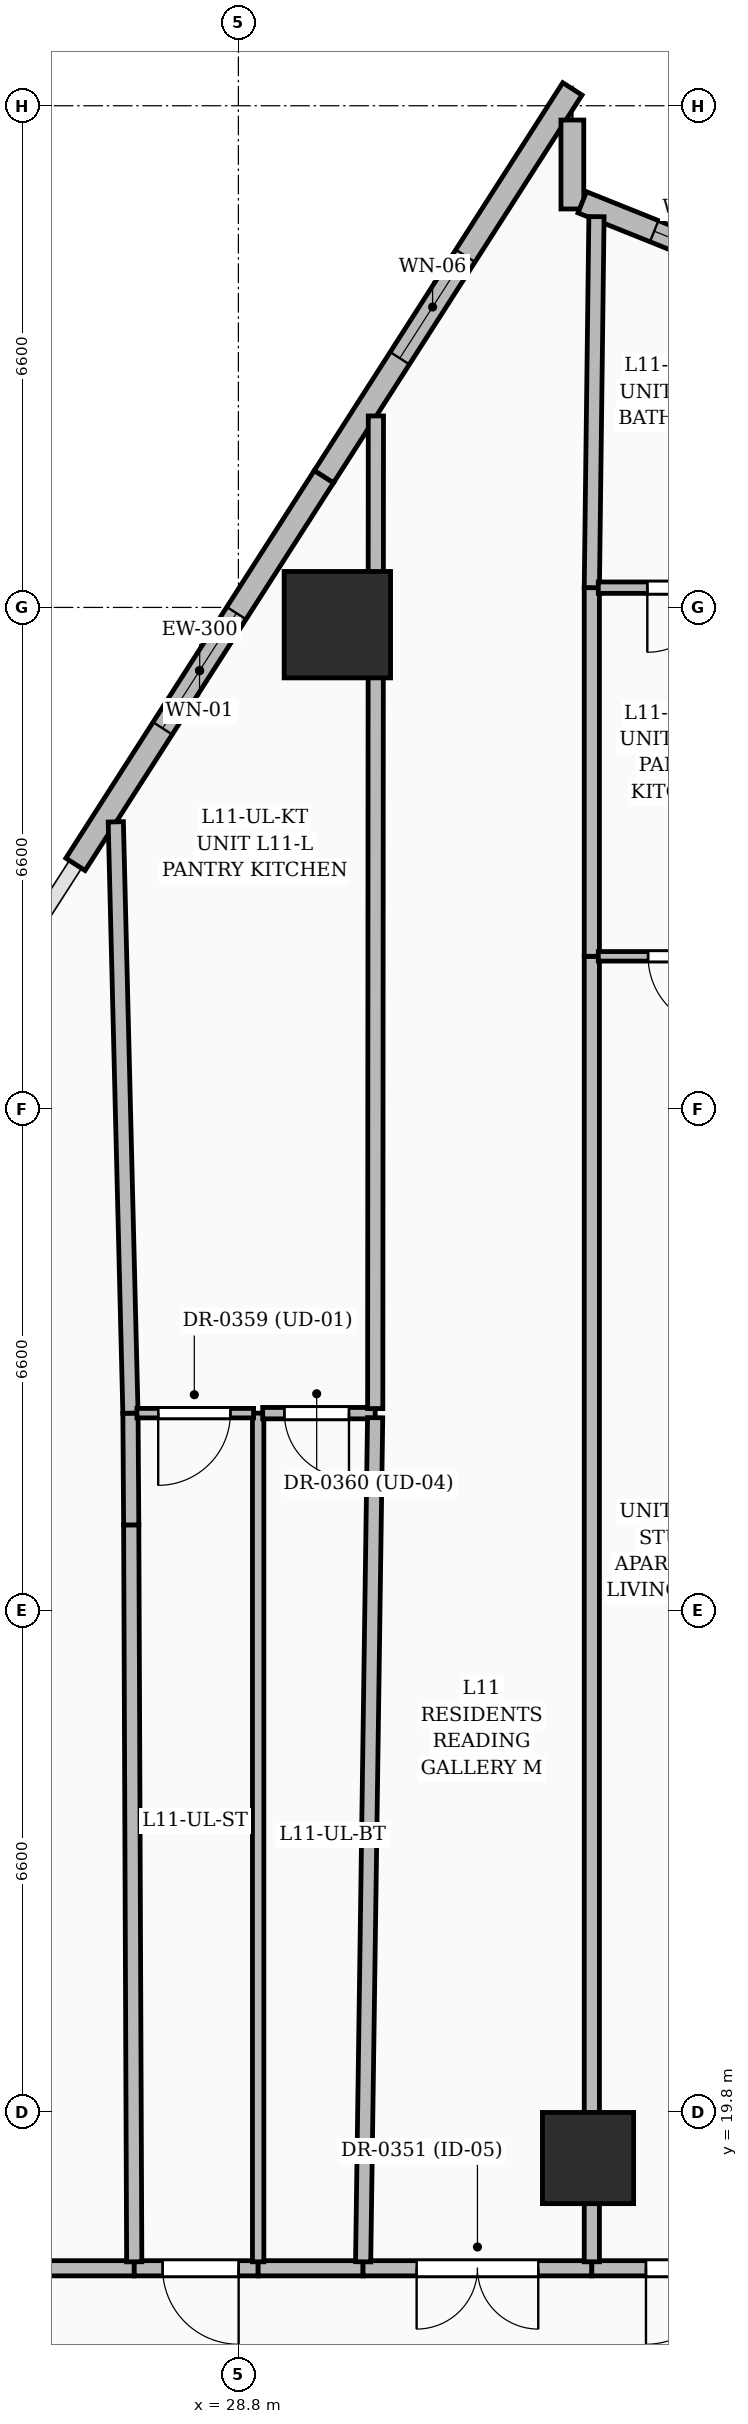
"""IFC4 building model, lengths in metres.
Left out: names, types, materials, properties, quantities, classifications, styles, units other than length and angle.
Written with IfcOpenShell. Run it as: python <this file> out.ifc"""

import sys

from ifc_helpers import new_model, si_unit, direction, frame, frame_2d, origin, origin_2d, place, context, subcontext, project, spatial, rectangle, extrude, element, fill, save


model = new_model("IFC4")
c1 = context("Model", 3, precision=1e-05, world=origin(), true_north=direction((0.0, 1.0)))
c2 = subcontext(c1, "Body", "Model", "MODEL_VIEW")
j1 = project(units=[si_unit("LENGTHUNIT", "METRE"), si_unit("PLANEANGLEUNIT", "RADIAN")], contexts=[c1])
p1 = place(None, origin())
s1 = spatial("IfcSite", under=j1, at=p1, CompositionType="ELEMENT")
p2 = place(p1, origin())
s2 = spatial("IfcBuilding", under=s1, at=p2, CompositionType="ELEMENT")
p3 = place(p2, frame((0.0, 0.0, 49.8)))
s3 = spatial("IfcBuildingStorey", under=s2, at=p3, CompositionType="ELEMENT", Elevation=49.8)
p4 = place(p3, frame((33.4, 19.2, 0.0), z_axis=(0.0, 0.0, 1.0), x_axis=(1.0, 0.0, 0.0)))
e1 = element("IfcColumn", 1, at=p4, inside=s3, PredefinedType="COLUMN", context=c2, shape_type="SweptSolid", body=[
    extrude(rectangle(XDim=1.2, YDim=1.2, at=origin_2d()), origin(), (0.0, 0.0, 1.0), 3.6),
])
p5 = place(p3, frame((30.102, 39.373, 0.0), z_axis=(0.0, 0.0, 1.0), x_axis=(1.0, 0.0, 0.0)))
e2 = element("IfcColumn", 2, at=p5, inside=s3, PredefinedType="COLUMN", context=c2, shape_type="SweptSolid", body=[
    extrude(rectangle(XDim=1.4, YDim=1.4, at=origin_2d()), origin(), (0.0, 0.0, 1.0), 3.6),
])
p6 = place(p3, frame((26.657, 36.22, 0.0), z_axis=(0.0, 0.0, 1.0), x_axis=(0.539506453767, 0.841981464371, 0.0)))
e3 = element("IfcWall", 3, at=p6, inside=s3, PredefinedType="SOLIDWALL", context=c2, shape_type="SweptSolid", body=[
    extrude(rectangle(XDim=6.058, YDim=0.3, at=frame_2d((3.029, 0.0))), origin(), (0.0, 0.0, 1.0), 3.35),
])
p7 = place(p6, frame((2.125, 0.0, 0.6)))
e4 = element("IfcOpeningElement", 4, at=p7, cuts=e3, PredefinedType="OPENING", context=c2, shape_type="SweptSolid", body=[
    extrude(rectangle(XDim=1.8, YDim=2.1, at=frame_2d((0.9, 1.05))), frame((0.0, 0.16, 0.0), z_axis=(0.0, -1.0, 0.0), x_axis=(1.0, 0.0, 0.0)), (0.0, 0.0, 1.0), 0.32),
])
p8 = place(p3, frame((29.925, 41.321, 0.0), z_axis=(0.0, 0.0, 1.0), x_axis=(0.53953502124, 0.841963158847, 0.0)))
e5 = element("IfcWall", 5, at=p8, inside=s3, PredefinedType="SOLIDWALL", context=c2, shape_type="SweptSolid", body=[
    extrude(rectangle(XDim=6.059, YDim=0.3, at=frame_2d((3.029, 0.0))), origin(), (0.0, 0.0, 1.0), 3.35),
])
p9 = place(p8, frame((1.85, 0.0, 0.55)))
e6 = element("IfcOpeningElement", 6, at=p9, cuts=e5, PredefinedType="OPENING", context=c2, shape_type="SweptSolid", body=[
    extrude(rectangle(XDim=1.6, YDim=2.2, at=frame_2d((0.8, 1.1))), frame((0.0, 0.16, 0.0), z_axis=(0.0, -1.0, 0.0), x_axis=(1.0, 0.0, 0.0)), (0.0, 0.0, 1.0), 0.32),
])
p10 = place(p3, frame((33.194, 46.012, 0.0), z_axis=(0.0, 0.0, 1.0), x_axis=(0.0, -1.0, 0.0)))
e7 = element("IfcWall", 7, at=p10, inside=s3, PredefinedType="SOLIDWALL", context=c2, shape_type="SweptSolid", body=[
    extrude(rectangle(XDim=1.17, YDim=0.3, at=frame_2d((0.585, 0.0))), origin(), (0.0, 0.0, 1.0), 3.35),
])
p11 = place(p3, frame((33.324, 44.93, 0.0), z_axis=(0.0, 0.0, 1.0), x_axis=(0.928091921944, -0.372351157407, 0.0)))
e8 = element("IfcWall", 8, at=p11, inside=s3, PredefinedType="SOLIDWALL", context=c2, shape_type="SweptSolid", body=[
    extrude(rectangle(XDim=3.023, YDim=0.3, at=frame_2d((1.512, 0.0))), origin(), (0.0, 0.0, 1.0), 3.35),
])
p12 = place(p11, frame((1.02, 0.0, 0.8)))
e9 = element("IfcOpeningElement", 9, at=p12, cuts=e8, PredefinedType="OPENING", context=c2, shape_type="SweptSolid", body=[
    extrude(rectangle(XDim=1.2, YDim=1.8, at=frame_2d((0.6, 0.9))), frame((0.0, 0.16, 0.0), z_axis=(0.0, -1.0, 0.0), x_axis=(1.0, 0.0, 0.0)), (0.0, 0.0, 1.0), 0.32),
])
p13 = place(p3, frame((27.43, 17.75, 0.0), z_axis=(0.0, 0.0, 1.0), x_axis=(-1.0, 0.0, 0.0)))
e10 = element("IfcWall", 10, at=p13, inside=s3, PredefinedType="PARTITIONING", context=c2, shape_type="SweptSolid", body=[
    extrude(rectangle(XDim=5.945, YDim=0.2, at=frame_2d((2.972, 0.0))), origin(), (0.0, 0.0, 1.0), 1.12),
])
p14 = place(p3, frame((29.06, 17.75, 0.0), z_axis=(0.0, 0.0, 1.0), x_axis=(-1.0, 0.0, 0.0)))
e11 = element("IfcWall", 11, at=p14, inside=s3, PredefinedType="PARTITIONING", context=c2, shape_type="SweptSolid", body=[
    extrude(rectangle(XDim=1.63, YDim=0.2, at=frame_2d((0.815, 0.0))), origin(), (0.0, 0.0, 1.0), 3.35),
])
p15 = place(p14, frame((0.257, 0.0, 0.0)))
e12 = element("IfcOpeningElement", 12, at=p15, cuts=e11, PredefinedType="OPENING", context=c2, shape_type="SweptSolid", body=[
    extrude(rectangle(XDim=1.0, YDim=2.2, at=frame_2d((0.5, 1.1))), frame((0.0, 0.11, 0.0), z_axis=(0.0, -1.0, 0.0), x_axis=(1.0, 0.0, 0.0)), (0.0, 0.0, 1.0), 0.22),
])
p16 = place(p3, frame((30.44, 17.75, 0.0), z_axis=(0.0, 0.0, 1.0), x_axis=(-1.0, 0.0, 0.0)))
e13 = element("IfcWall", 13, at=p16, inside=s3, PredefinedType="PARTITIONING", context=c2, shape_type="SweptSolid", body=[
    extrude(rectangle(XDim=1.38, YDim=0.2, at=frame_2d((0.69, 0.0))), origin(), (0.0, 0.0, 1.0), 3.35),
])
p17 = place(p3, frame((33.45, 17.75, 0.0), z_axis=(0.0, 0.0, 1.0), x_axis=(-1.0, 0.0, 0.0)))
e14 = element("IfcWall", 14, at=p17, inside=s3, PredefinedType="PARTITIONING", context=c2, shape_type="SweptSolid", body=[
    extrude(rectangle(XDim=3.01, YDim=0.2, at=frame_2d((1.505, 0.0))), origin(), (0.0, 0.0, 1.0), 3.35),
])
p18 = place(p17, frame((0.705, 0.0, 0.0)))
e15 = element("IfcOpeningElement", 15, at=p18, cuts=e14, PredefinedType="OPENING", context=c2, shape_type="SweptSolid", body=[
    extrude(rectangle(XDim=1.6, YDim=2.3, at=frame_2d((0.8, 1.15))), frame((0.0, 0.11, 0.0), z_axis=(0.0, -1.0, 0.0), x_axis=(1.0, 0.0, 0.0)), (0.0, 0.0, 1.0), 0.22),
])
p19 = place(p3, frame((35.76, 17.75, 0.0), z_axis=(0.0, 0.0, 1.0), x_axis=(-1.0, 0.0, 0.0)))
e16 = element("IfcWall", 16, at=p19, inside=s3, PredefinedType="PARTITIONING", context=c2, shape_type="SweptSolid", body=[
    extrude(rectangle(XDim=2.31, YDim=0.2, at=frame_2d((1.155, 0.0))), origin(), (0.0, 0.0, 1.0), 2.309),
])
p20 = place(p19, frame((0.598, 0.0, 0.0)))
e17 = element("IfcOpeningElement", 17, at=p20, cuts=e16, PredefinedType="OPENING", context=c2, shape_type="SweptSolid", body=[
    extrude(rectangle(XDim=1.0, YDim=2.2, at=frame_2d((0.5, 1.1))), frame((0.0, 0.11, 0.0), z_axis=(0.0, -1.0, 0.0), x_axis=(1.0, 0.0, 0.0)), (0.0, 0.0, 1.0), 0.22),
])
p21 = place(p3, frame((27.43, 17.835, 0.0), z_axis=(0.0, 0.0, 1.0), x_axis=(-0.004104621563, 0.999991576005, 0.0)))
e18 = element("IfcWall", 18, at=p21, inside=s3, PredefinedType="PARTITIONING", context=c2, shape_type="SweptSolid", body=[
    extrude(rectangle(XDim=9.695, YDim=0.2, at=frame_2d((4.848, 0.0))), origin(), (0.0, 0.0, 1.0), 1.12),
])
p22 = place(p3, frame((27.39, 27.53, 0.0), z_axis=(0.0, 0.0, 1.0), x_axis=(-0.006809342213, 0.999976816161, 0.0)))
e19 = element("IfcWall", 19, at=p22, inside=s3, PredefinedType="PARTITIONING", context=c2, shape_type="SweptSolid", body=[
    extrude(rectangle(XDim=1.47, YDim=0.2, at=frame_2d((0.735, 0.0))), origin(), (0.0, 0.0, 1.0), 2.911),
])
p23 = place(p3, frame((27.38, 29.0, 0.0), z_axis=(0.0, 0.0, 1.0), x_axis=(-0.024786030679, 0.999692779149, 0.0)))
e20 = element("IfcWall", 20, at=p23, inside=s3, PredefinedType="PARTITIONING", context=c2, shape_type="SweptSolid", body=[
    extrude(rectangle(XDim=7.781, YDim=0.2, at=frame_2d((3.891, 0.0))), origin(), (0.0, 0.0, 1.0), 2.37),
])
p24 = place(p3, frame((29.06, 17.835, 0.0), z_axis=(0.0, 0.0, 1.0), x_axis=(0.0, 1.0, 0.0)))
e21 = element("IfcWall", 21, at=p24, inside=s3, PredefinedType="PARTITIONING", context=c2, shape_type="SweptSolid", body=[
    extrude(rectangle(XDim=11.165, YDim=0.15, at=frame_2d((5.583, 0.0))), origin(), (0.0, 0.0, 1.0), 1.12),
])
p25 = place(p3, frame((29.0, 29.0, 0.0), z_axis=(0.0, 0.0, 1.0), x_axis=(-1.0, 0.0, 0.0)))
e22 = element("IfcWall", 22, at=p25, inside=s3, PredefinedType="PARTITIONING", context=c2, shape_type="SweptSolid", body=[
    extrude(rectangle(XDim=1.535, YDim=0.125, at=frame_2d((0.768, 0.0))), origin(), (0.0, 0.0, 1.0), 2.911),
])
p26 = place(p25, frame((0.305, 0.0, 0.0)))
e23 = element("IfcOpeningElement", 23, at=p26, cuts=e22, PredefinedType="OPENING", context=c2, shape_type="SweptSolid", body=[
    extrude(rectangle(XDim=0.95, YDim=2.2, at=frame_2d((0.475, 1.1))), frame((0.0, 0.072, 0.0), z_axis=(0.0, -1.0, 0.0), x_axis=(1.0, 0.0, 0.0)), (0.0, 0.0, 1.0), 0.145),
])
p27 = place(p3, frame((30.6, 29.0, 0.0), z_axis=(0.0, 0.0, 1.0), x_axis=(-1.0, 0.0, 0.0)))
e24 = element("IfcWall", 24, at=p27, inside=s3, PredefinedType="PARTITIONING", context=c2, shape_type="SweptSolid", body=[
    extrude(rectangle(XDim=1.48, YDim=0.15, at=frame_2d((0.74, 0.0))), origin(), (0.0, 0.0, 1.0), 3.35),
])
p28 = place(p27, frame((0.345, 0.0, 0.0)))
e25 = element("IfcOpeningElement", 25, at=p28, cuts=e24, PredefinedType="OPENING", context=c2, shape_type="SweptSolid", body=[
    extrude(rectangle(XDim=0.85, YDim=2.1, at=frame_2d((0.425, 1.05))), frame((0.0, 0.085, 0.0), z_axis=(0.0, -1.0, 0.0), x_axis=(1.0, 0.0, 0.0)), (0.0, 0.0, 1.0), 0.17),
])
p29 = place(p3, frame((30.441, 17.835, 0.0), z_axis=(0.0, 0.0, 1.0), x_axis=(0.014222718139, 0.999898852029, 0.0)))
e26 = element("IfcWall", 26, at=p29, inside=s3, PredefinedType="PARTITIONING", context=c2, shape_type="SweptSolid", body=[
    extrude(rectangle(XDim=11.106, YDim=0.2, at=frame_2d((5.553, 0.0))), origin(), (0.0, 0.0, 1.0), 1.12),
])
p30 = place(p3, frame((30.6, 29.06, 0.0), z_axis=(0.0, 0.0, 1.0), x_axis=(0.000673035425, 0.999999773512, 0.0)))
e27 = element("IfcWall", 27, at=p30, inside=s3, PredefinedType="PARTITIONING", context=c2, shape_type="SweptSolid", body=[
    extrude(rectangle(XDim=13.059, YDim=0.2, at=frame_2d((6.529, 0.0))), origin(), (0.0, 0.0, 1.0), 1.12),
])
p31 = place(p3, frame((33.45, 17.835, 0.0), z_axis=(0.0, 0.0, 1.0), x_axis=(0.0, 1.0, 0.0)))
e28 = element("IfcWall", 28, at=p31, inside=s3, PredefinedType="PARTITIONING", context=c2, shape_type="SweptSolid", body=[
    extrude(rectangle(XDim=17.175, YDim=0.2, at=frame_2d((8.587, 0.0))), origin(), (0.0, 0.0, 1.0), 1.12),
])
p32 = place(p3, frame((33.45, 35.01, 0.0), z_axis=(0.0, 0.0, 1.0), x_axis=(0.0, 1.0, 0.0)))
e29 = element("IfcWall", 29, at=p32, inside=s3, PredefinedType="PARTITIONING", context=c2, shape_type="SweptSolid", body=[
    extrude(rectangle(XDim=4.85, YDim=0.2, at=frame_2d((2.425, 0.0))), origin(), (0.0, 0.0, 1.0), 2.37),
])
p33 = place(p3, frame((33.45, 39.86, 0.0), z_axis=(0.0, 0.0, 1.0), x_axis=(0.01250402438, 0.999921821631, 0.0)))
e30 = element("IfcWall", 30, at=p33, inside=s3, PredefinedType="PARTITIONING", context=c2, shape_type="SweptSolid", body=[
    extrude(rectangle(XDim=4.881, YDim=0.2, at=frame_2d((2.441, 0.0))), origin(), (0.0, 0.0, 1.0), 3.35),
])
p34 = place(p3, frame((35.76, 35.01, 0.0), z_axis=(0.0, 0.0, 1.0), x_axis=(-1.0, 0.0, 0.0)))
e31 = element("IfcWall", 31, at=p34, inside=s3, PredefinedType="PARTITIONING", context=c2, shape_type="SweptSolid", body=[
    extrude(rectangle(XDim=2.225, YDim=0.125, at=frame_2d((1.113, 0.0))), origin(), (0.0, 0.0, 1.0), 3.35),
])
p35 = place(p34, frame((0.62, 0.0, 0.0)))
e32 = element("IfcOpeningElement", 32, at=p35, cuts=e31, PredefinedType="OPENING", context=c2, shape_type="SweptSolid", body=[
    extrude(rectangle(XDim=0.95, YDim=2.2, at=frame_2d((0.475, 1.1))), frame((0.0, 0.072, 0.0), z_axis=(0.0, -1.0, 0.0), x_axis=(1.0, 0.0, 0.0)), (0.0, 0.0, 1.0), 0.145),
])
p36 = place(p3, frame((35.76, 39.86, 0.0), z_axis=(0.0, 0.0, 1.0), x_axis=(-1.0, 0.0, 0.0)))
e33 = element("IfcWall", 33, at=p36, inside=s3, PredefinedType="PARTITIONING", context=c2, shape_type="SweptSolid", body=[
    extrude(rectangle(XDim=2.225, YDim=0.15, at=frame_2d((1.113, 0.0))), origin(), (0.0, 0.0, 1.0), 3.35),
])
p37 = place(p36, frame((0.73, 0.0, 0.0)))
e34 = element("IfcOpeningElement", 34, at=p37, cuts=e33, PredefinedType="OPENING", context=c2, shape_type="SweptSolid", body=[
    extrude(rectangle(XDim=0.85, YDim=2.1, at=frame_2d((0.425, 1.05))), frame((0.0, 0.085, 0.0), z_axis=(0.0, -1.0, 0.0), x_axis=(1.0, 0.0, 0.0)), (0.0, 0.0, 1.0), 0.17),
])
p38 = place(p7, origin())
e35 = element("IfcWindow", 35, at=p38, inside=s3, PartitioningType="SINGLE_PANEL", PredefinedType="WINDOW", context=c2, shape_type="SweptSolid", body=[
    extrude(rectangle(XDim=1.8, YDim=2.1, at=frame_2d((0.9, 1.05))), frame((0.0, 0.03, 0.0), z_axis=(0.0, -1.0, 0.0), x_axis=(1.0, 0.0, 0.0)), (0.0, 0.0, 1.0), 0.06),
])
fill(e4, e35)
p39 = place(p9, origin())
e36 = element("IfcWindow", 36, at=p39, inside=s3, PartitioningType="SINGLE_PANEL", PredefinedType="WINDOW", context=c2, shape_type="SweptSolid", body=[
    extrude(rectangle(XDim=1.6, YDim=2.2, at=frame_2d((0.8, 1.1))), frame((0.0, 0.03, 0.0), z_axis=(0.0, -1.0, 0.0), x_axis=(1.0, 0.0, 0.0)), (0.0, 0.0, 1.0), 0.06),
])
fill(e6, e36)
p40 = place(p12, origin())
e37 = element("IfcWindow", 37, at=p40, inside=s3, PartitioningType="SINGLE_PANEL", PredefinedType="WINDOW", context=c2, shape_type="SweptSolid", body=[
    extrude(rectangle(XDim=1.2, YDim=1.8, at=frame_2d((0.6, 0.9))), frame((0.0, 0.03, 0.0), z_axis=(0.0, -1.0, 0.0), x_axis=(1.0, 0.0, 0.0)), (0.0, 0.0, 1.0), 0.06),
])
fill(e9, e37)
p41 = place(p18, origin())
e38 = element("IfcDoor", 38, at=p41, inside=s3, OperationType="DOUBLE_DOOR_SINGLE_SWING", PredefinedType="DOOR", context=c2, shape_type="SweptSolid", body=[
    extrude(rectangle(XDim=1.6, YDim=2.3, at=frame_2d((0.8, 1.15))), frame((0.0, 0.025, 0.0), z_axis=(0.0, -1.0, 0.0), x_axis=(1.0, 0.0, 0.0)), (0.0, 0.0, 1.0), 0.05),
])
fill(e15, e38)
p42 = place(p15, origin())
e39 = element("IfcDoor", 39, at=p42, inside=s3, OperationType="SINGLE_SWING_LEFT", PredefinedType="DOOR", context=c2, shape_type="SweptSolid", body=[
    extrude(rectangle(XDim=1.0, YDim=2.2, at=frame_2d((0.5, 1.1))), frame((0.0, 0.025, 0.0), z_axis=(0.0, -1.0, 0.0), x_axis=(1.0, 0.0, 0.0)), (0.0, 0.0, 1.0), 0.05),
])
fill(e12, e39)
p43 = place(p26, origin())
e40 = element("IfcDoor", 40, at=p43, inside=s3, OperationType="SINGLE_SWING_RIGHT", PredefinedType="DOOR", context=c2, shape_type="SweptSolid", body=[
    extrude(rectangle(XDim=0.95, YDim=2.2, at=frame_2d((0.475, 1.1))), frame((0.0, 0.025, 0.0), z_axis=(0.0, -1.0, 0.0), x_axis=(1.0, 0.0, 0.0)), (0.0, 0.0, 1.0), 0.05),
])
fill(e23, e40)
p44 = place(p28, origin())
e41 = element("IfcDoor", 41, at=p44, inside=s3, OperationType="SINGLE_SWING_LEFT", PredefinedType="DOOR", context=c2, shape_type="SweptSolid", body=[
    extrude(rectangle(XDim=0.85, YDim=2.1, at=frame_2d((0.425, 1.05))), frame((0.0, 0.025, 0.0), z_axis=(0.0, -1.0, 0.0), x_axis=(1.0, 0.0, 0.0)), (0.0, 0.0, 1.0), 0.05),
])
fill(e25, e41)
p45 = place(p20, origin())
e42 = element("IfcDoor", 42, at=p45, inside=s3, OperationType="SINGLE_SWING_RIGHT", PredefinedType="DOOR", context=c2, shape_type="SweptSolid", body=[
    extrude(rectangle(XDim=1.0, YDim=2.2, at=frame_2d((0.5, 1.1))), frame((0.0, 0.025, 0.0), z_axis=(0.0, -1.0, 0.0), x_axis=(1.0, 0.0, 0.0)), (0.0, 0.0, 1.0), 0.05),
])
fill(e17, e42)
p46 = place(p35, origin())
e43 = element("IfcDoor", 43, at=p46, inside=s3, OperationType="SINGLE_SWING_LEFT", PredefinedType="DOOR", context=c2, shape_type="SweptSolid", body=[
    extrude(rectangle(XDim=0.95, YDim=2.2, at=frame_2d((0.475, 1.1))), frame((0.0, 0.025, 0.0), z_axis=(0.0, -1.0, 0.0), x_axis=(1.0, 0.0, 0.0)), (0.0, 0.0, 1.0), 0.05),
])
fill(e32, e43)
p47 = place(p37, origin())
e44 = element("IfcDoor", 44, at=p47, inside=s3, OperationType="SINGLE_SWING_RIGHT", PredefinedType="DOOR", context=c2, shape_type="SweptSolid", body=[
    extrude(rectangle(XDim=0.85, YDim=2.1, at=frame_2d((0.425, 1.05))), frame((0.0, 0.025, 0.0), z_axis=(0.0, -1.0, 0.0), x_axis=(1.0, 0.0, 0.0)), (0.0, 0.0, 1.0), 0.05),
])
fill(e34, e44)
save(model, sys.argv[1])
